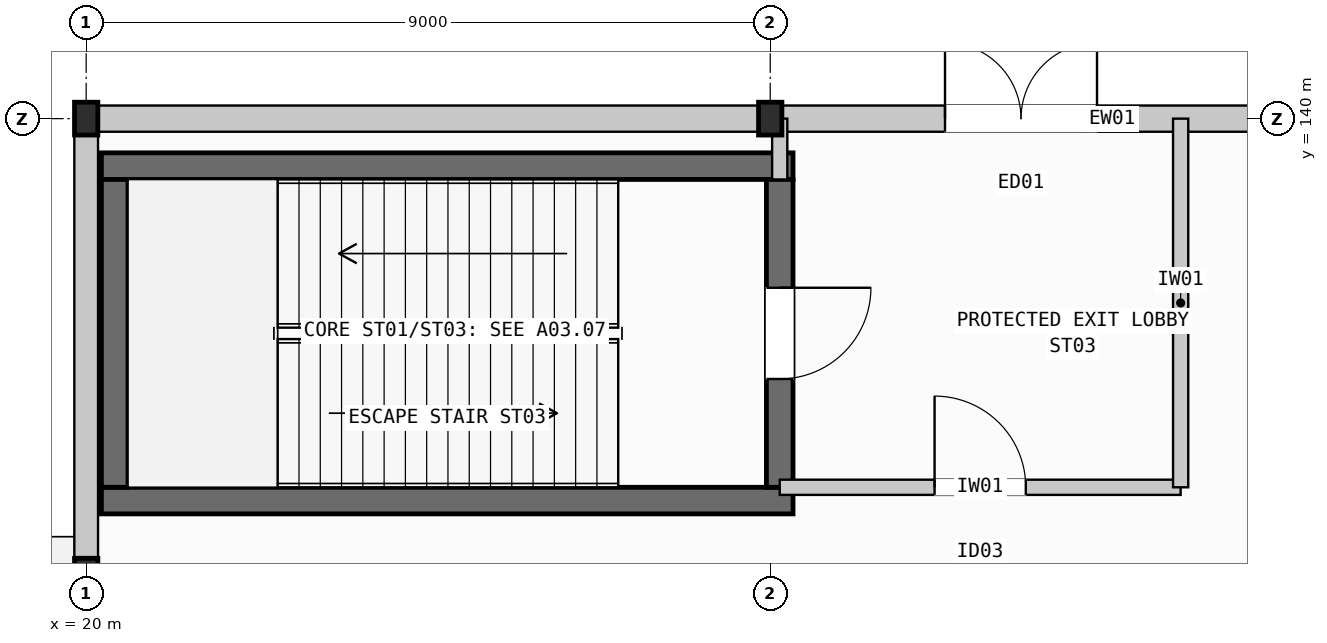
"""IFC4 building model, lengths in metres.
Left out: names, types, materials, properties, quantities, classifications, styles, units other than length and angle.
Written with IfcOpenShell. Run it as: python <this file> out.ifc"""

import sys

from ifc_helpers import new_model, si_unit, direction, frame, frame_2d, origin, origin_2d, place, context, subcontext, project, spatial, rectangle, i_section, extrude, element, fill, save


model = new_model("IFC4")
c1 = context("Model", 3, precision=1e-05, world=origin(), true_north=direction((0.0, 1.0)))
c2 = subcontext(c1, "Body", "Model", "MODEL_VIEW")
j1 = project(units=[si_unit("LENGTHUNIT", "METRE"), si_unit("PLANEANGLEUNIT", "RADIAN")], contexts=[c1])
p1 = place(None, origin())
s1 = spatial("IfcSite", under=j1, at=p1, CompositionType="ELEMENT")
p2 = place(p1, origin())
s2 = spatial("IfcBuilding", under=s1, at=p2, CompositionType="ELEMENT")
p3 = place(p2, origin())
s3 = spatial("IfcBuildingStorey", under=s2, at=p3, CompositionType="ELEMENT", Elevation=0.0)
for number, where, z_axis, x_axis in (
    (1, (20.0, 134.0, 0.0), (0.0, 0.0, 1.0), (1.0, 0.0, 0.0)),
    (2, (20.0, 140.0, 0.0), (0.0, 0.0, 1.0), (1.0, 0.0, 0.0)),
    (3, (29.0, 140.0, 0.0), (0.0, 0.0, 1.0), (1.0, 0.0, 0.0)),
):
    element("IfcColumn", number, at=place(p3, frame(where, z_axis=z_axis, x_axis=x_axis)), inside=s3, PredefinedType="COLUMN", context=c2, shape_type="SweptSolid", body=[
        extrude(i_section(OverallWidth=0.307, OverallDepth=0.432, WebThickness=0.021, FlangeThickness=0.04, FilletRadius=0.027, at=origin_2d()), origin(), (0.0, 0.0, 1.0), 6.0),
    ])
for number, where, z_axis, x_axis in (
    (4, (20.2, 134.975, 0.0), (0.0, 0.0, 1.0), (1.0, 0.0, 0.0)),
    (5, (20.2, 139.375, 0.0), (0.0, 0.0, 1.0), (1.0, 0.0, 0.0)),
):
    element("IfcWall", number, at=place(p3, frame(where, z_axis=z_axis, x_axis=x_axis)), inside=s3, PredefinedType="SHEAR", context=c2, shape_type="SweptSolid", body=[
        extrude(rectangle(XDim=9.1, YDim=0.35, at=frame_2d((4.55, 0.0))), origin(), (0.0, 0.0, 1.0), 6.0),
    ])
p4 = place(p3, frame((20.375, 135.15, 0.0), z_axis=(0.0, 0.0, 1.0), x_axis=(0.0, 1.0, 0.0)))
e6 = element("IfcWall", 6, at=p4, inside=s3, PredefinedType="SHEAR", context=c2, shape_type="SweptSolid", body=[
    extrude(rectangle(XDim=4.05, YDim=0.35, at=frame_2d((2.025, 0.0))), origin(), (0.0, 0.0, 1.0), 6.0),
])
p5 = place(p3, frame((29.125, 135.15, 0.0), z_axis=(0.0, 0.0, 1.0), x_axis=(0.0, 1.0, 0.0)))
e7 = element("IfcWall", 7, at=p5, inside=s3, PredefinedType="SHEAR", context=c2, shape_type="SweptSolid", body=[
    extrude(rectangle(XDim=4.05, YDim=0.35, at=frame_2d((2.025, 0.0))), origin(), (0.0, 0.0, 1.0), 6.0),
])
p6 = place(p5, frame((1.425, 0.0, 0.0)))
e8 = element("IfcOpeningElement", 8, at=p6, cuts=e7, PredefinedType="OPENING", context=c2, shape_type="SweptSolid", body=[
    extrude(rectangle(XDim=1.2, YDim=2.2, at=frame_2d((0.6, 1.1))), frame((0.0, 0.185, 0.0), z_axis=(0.0, -1.0, 0.0), x_axis=(1.0, 0.0, 0.0)), (0.0, 0.0, 1.0), 0.37),
])
p7 = place(p3, frame((20.149, 140.0, 0.0), z_axis=(0.0, 0.0, 1.0), x_axis=(1.0, 0.0, 0.0)))
e9 = element("IfcWall", 9, at=p7, inside=s3, PredefinedType="STANDARD", context=c2, shape_type="SweptSolid", body=[
    extrude(rectangle(XDim=8.701, YDim=0.345, at=frame_2d((4.351, 0.0))), origin(), (0.0, 0.0, 1.0), 4.958),
])
p8 = place(p3, frame((29.149, 140.0, 0.0), z_axis=(0.0, 0.0, 1.0), x_axis=(1.0, 0.0, 0.0)))
e10 = element("IfcWall", 10, at=p8, inside=s3, PredefinedType="STANDARD", context=c2, shape_type="SweptSolid", body=[
    extrude(rectangle(XDim=8.701, YDim=0.345, at=frame_2d((4.351, 0.0))), origin(), (0.0, 0.0, 1.0), 4.958),
])
p9 = place(p8, frame((2.15, 0.0, 0.0)))
e11 = element("IfcOpeningElement", 11, at=p9, cuts=e10, PredefinedType="OPENING", context=c2, shape_type="SweptSolid", body=[
    extrude(rectangle(XDim=2.0, YDim=2.3, at=frame_2d((1.0, 1.15))), frame((0.0, 0.183, 0.0), z_axis=(0.0, -1.0, 0.0), x_axis=(1.0, 0.0, 0.0)), (0.0, 0.0, 1.0), 0.365),
])
p10 = place(p3, frame((20.0, 134.212, 0.0), z_axis=(0.0, 0.0, 1.0), x_axis=(0.0, 1.0, 0.0)))
e12 = element("IfcWall", 12, at=p10, inside=s3, PredefinedType="STANDARD", context=c2, shape_type="SweptSolid", body=[
    extrude(rectangle(XDim=5.576, YDim=0.312, at=frame_2d((2.788, 0.0))), origin(), (0.0, 0.0, 1.0), 4.958),
])
p11 = place(p3, frame((29.125, 135.15, 0.0), z_axis=(0.0, 0.0, 1.0), x_axis=(1.0, 0.0, 0.0)))
e13 = element("IfcWall", 13, at=p11, inside=s3, PredefinedType="PARTITIONING", context=c2, shape_type="SweptSolid", body=[
    extrude(rectangle(XDim=5.275, YDim=0.2, at=frame_2d((2.637, 0.0))), origin(), (0.0, 0.0, 1.0), 4.2),
])
p12 = place(p11, frame((2.038, 0.0, 0.0)))
e14 = element("IfcOpeningElement", 14, at=p12, cuts=e13, PredefinedType="OPENING", context=c2, shape_type="SweptSolid", body=[
    extrude(rectangle(XDim=1.2, YDim=2.2, at=frame_2d((0.6, 1.1))), frame((0.0, 0.11, 0.0), z_axis=(0.0, -1.0, 0.0), x_axis=(1.0, 0.0, 0.0)), (0.0, 0.0, 1.0), 0.22),
])
p13 = place(p3, frame((34.4, 135.15, 0.0), z_axis=(0.0, 0.0, 1.0), x_axis=(0.0, 1.0, 0.0)))
e15 = element("IfcWall", 15, at=p13, inside=s3, PredefinedType="PARTITIONING", context=c2, shape_type="SweptSolid", body=[
    extrude(rectangle(XDim=4.85, YDim=0.2, at=frame_2d((2.425, 0.0))), origin(), (0.0, 0.0, 1.0), 4.2),
])
p14 = place(p3, frame((29.125, 139.2, 0.0), z_axis=(0.0, 0.0, 1.0), x_axis=(0.0, 1.0, 0.0)))
e16 = element("IfcWall", 16, at=p14, inside=s3, PredefinedType="PARTITIONING", context=c2, shape_type="SweptSolid", body=[
    extrude(rectangle(XDim=0.8, YDim=0.2, at=frame_2d((0.4, 0.0))), origin(), (0.0, 0.0, 1.0), 4.2),
])
p15 = place(p6, frame((1.2, 0.0, 0.0), z_axis=(0.0, 0.0, 1.0), x_axis=(-1.0, 0.0, 0.0)))
e17 = element("IfcDoor", 17, at=p15, inside=s3, OperationType="SINGLE_SWING_LEFT", PredefinedType="DOOR", context=c2, shape_type="SweptSolid", body=[
    extrude(rectangle(XDim=1.2, YDim=2.2, at=frame_2d((0.6, 1.1))), frame((0.0, 0.025, 0.0), z_axis=(0.0, -1.0, 0.0), x_axis=(1.0, 0.0, 0.0)), (0.0, 0.0, 1.0), 0.05),
])
fill(e8, e17)
p16 = place(p9, origin())
e18 = element("IfcDoor", 18, at=p16, inside=s3, OperationType="DOUBLE_DOOR_SINGLE_SWING", PredefinedType="DOOR", context=c2, shape_type="SweptSolid", body=[
    extrude(rectangle(XDim=2.0, YDim=2.3, at=frame_2d((1.0, 1.15))), frame((0.0, 0.025, 0.0), z_axis=(0.0, -1.0, 0.0), x_axis=(1.0, 0.0, 0.0)), (0.0, 0.0, 1.0), 0.05),
])
fill(e11, e18)
p17 = place(p12, origin())
e19 = element("IfcDoor", 19, at=p17, inside=s3, OperationType="SINGLE_SWING_LEFT", PredefinedType="DOOR", context=c2, shape_type="SweptSolid", body=[
    extrude(rectangle(XDim=1.2, YDim=2.2, at=frame_2d((0.6, 1.1))), frame((0.0, 0.025, 0.0), z_axis=(0.0, -1.0, 0.0), x_axis=(1.0, 0.0, 0.0)), (0.0, 0.0, 1.0), 0.05),
])
fill(e14, e19)
save(model, sys.argv[1])
